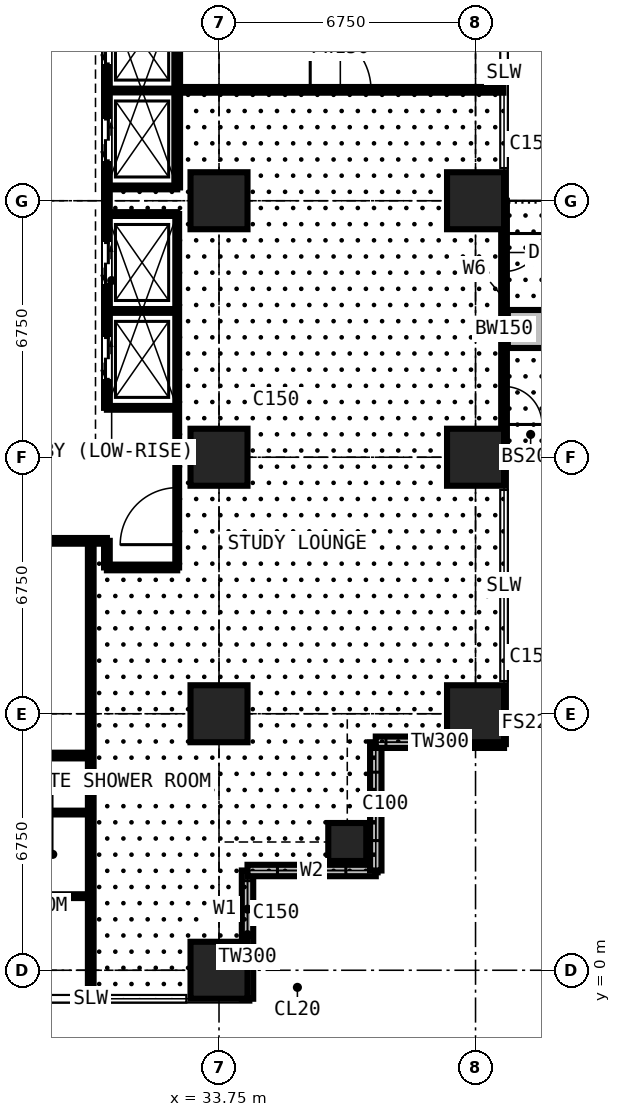
"""IFC4 building model, lengths in metres.
Left out: names, types, materials, properties, quantities, classifications, styles, units other than length and angle.
Written with IfcOpenShell. Run it as: python <this file> out.ifc"""

import sys

from ifc_helpers import new_model, si_unit, direction, frame, frame_2d, origin, origin_2d, place, context, subcontext, project, spatial, rectangle, extrude, element, fill, save


model = new_model("IFC4")
c1 = context("Model", 3, precision=1e-05, world=origin(), true_north=direction((0.0, 1.0)))
c2 = subcontext(c1, "Body", "Model", "MODEL_VIEW")
j1 = project(units=[si_unit("LENGTHUNIT", "METRE"), si_unit("PLANEANGLEUNIT", "RADIAN")], contexts=[c1])
p1 = place(None, origin())
s1 = spatial("IfcSite", under=j1, at=p1, CompositionType="ELEMENT")
p2 = place(p1, origin())
s2 = spatial("IfcBuilding", under=s1, at=p2, CompositionType="ELEMENT")
p3 = place(p2, frame((0.0, 0.0, 108.9)))
s3 = spatial("IfcBuildingStorey", under=s2, at=p3, CompositionType="ELEMENT", Elevation=108.9)
for number, where, z_axis, x_axis in (
    (1, (33.75, 0.0, 0.0), (0.0, 0.0, 1.0), (1.0, 0.0, 0.0)),
    (2, (33.75, 6.75, 0.0), (0.0, 0.0, 1.0), (1.0, 0.0, 0.0)),
    (3, (33.75, 13.5, 0.0), (0.0, 0.0, 1.0), (1.0, 0.0, 0.0)),
    (4, (33.75, 20.25, 0.0), (0.0, 0.0, 1.0), (1.0, 0.0, 0.0)),
):
    element("IfcColumn", number, at=place(p3, frame(where, z_axis=z_axis, x_axis=x_axis)), inside=s3, PredefinedType="COLUMN", context=c2, shape_type="SweptSolid", body=[
        extrude(rectangle(XDim=1.5, YDim=1.5, at=origin_2d()), origin(), (0.0, 0.0, 1.0), 3.6),
    ])
p4 = place(p3, frame((37.125, 3.375, 0.0), z_axis=(0.0, 0.0, 1.0), x_axis=(1.0, 0.0, 0.0)))
e5 = element("IfcColumn", 5, at=p4, inside=s3, PredefinedType="COLUMN", context=c2, shape_type="SweptSolid", body=[
    extrude(rectangle(XDim=1.0, YDim=1.0, at=origin_2d()), origin(), (0.0, 0.0, 1.0), 3.6),
])
for number, where, z_axis, x_axis in (
    (6, (40.5, 6.75, 0.0), (0.0, 0.0, 1.0), (1.0, 0.0, 0.0)),
    (7, (40.5, 13.5, 0.0), (0.0, 0.0, 1.0), (1.0, 0.0, 0.0)),
    (8, (40.5, 20.25, 0.0), (0.0, 0.0, 1.0), (1.0, 0.0, 0.0)),
):
    element("IfcColumn", number, at=place(p3, frame(where, z_axis=z_axis, x_axis=x_axis)), inside=s3, PredefinedType="COLUMN", context=c2, shape_type="SweptSolid", body=[
        extrude(rectangle(XDim=1.5, YDim=1.5, at=origin_2d()), origin(), (0.0, 0.0, 1.0), 3.6),
    ])
p5 = place(p3, frame((41.25, 20.25, 0.0), z_axis=(0.0, 0.0, 1.0), x_axis=(0.0, -1.0, 0.0)))
e9 = element("IfcWall", 9, at=p5, inside=s3, PredefinedType="SOLIDWALL", context=c2, shape_type="SweptSolid", body=[
    extrude(rectangle(XDim=6.75, YDim=0.15, at=frame_2d((3.375, 0.0))), origin(), (0.0, 0.0, 1.0), 3.375),
])
p6 = place(p5, frame((0.863, 0.0, 0.0)))
e10 = element("IfcOpeningElement", 10, at=p6, cuts=e9, PredefinedType="OPENING", context=c2, shape_type="SweptSolid", body=[
    extrude(rectangle(XDim=1.0, YDim=2.2, at=frame_2d((0.5, 1.1))), frame((0.0, 0.085, 0.0), z_axis=(0.0, -1.0, 0.0), x_axis=(1.0, 0.0, 0.0)), (0.0, 0.0, 1.0), 0.17),
])
p7 = place(p5, frame((1.975, 0.0, 0.9)))
e11 = element("IfcOpeningElement", 11, at=p7, cuts=e9, PredefinedType="OPENING", context=c2, shape_type="SweptSolid", body=[
    extrude(rectangle(XDim=1.2, YDim=1.8, at=frame_2d((0.6, 0.9))), frame((0.0, 0.085, 0.0), z_axis=(0.0, -1.0, 0.0), x_axis=(1.0, 0.0, 0.0)), (0.0, 0.0, 1.0), 0.17),
])
p8 = place(p5, frame((4.887, 0.0, 0.0)))
e12 = element("IfcOpeningElement", 12, at=p8, cuts=e9, PredefinedType="OPENING", context=c2, shape_type="SweptSolid", body=[
    extrude(rectangle(XDim=1.0, YDim=2.2, at=frame_2d((0.5, 1.1))), frame((0.0, 0.085, 0.0), z_axis=(0.0, -1.0, 0.0), x_axis=(1.0, 0.0, 0.0)), (0.0, 0.0, 1.0), 0.17),
])
p9 = place(p5, frame((3.575, 0.0, 0.9)))
e13 = element("IfcOpeningElement", 13, at=p9, cuts=e9, PredefinedType="OPENING", context=c2, shape_type="SweptSolid", body=[
    extrude(rectangle(XDim=1.2, YDim=1.8, at=frame_2d((0.6, 0.9))), frame((0.0, 0.085, 0.0), z_axis=(0.0, -1.0, 0.0), x_axis=(1.0, 0.0, 0.0)), (0.0, 0.0, 1.0), 0.17),
])
p10 = place(p3, frame((34.5, -0.75, 0.0), z_axis=(0.0, 0.0, 1.0), x_axis=(0.0, 1.0, 0.0)))
e14 = element("IfcWall", 14, at=p10, inside=s3, PredefinedType="SOLIDWALL", context=c2, shape_type="SweptSolid", body=[
    extrude(rectangle(XDim=3.375, YDim=0.3, at=frame_2d((1.688, 0.0))), origin(), (0.0, 0.0, 1.0), 3.375),
])
p11 = place(p10, frame((1.607, 0.0, 0.9)))
e15 = element("IfcOpeningElement", 15, at=p11, cuts=e14, PredefinedType="OPENING", context=c2, shape_type="SweptSolid", body=[
    extrude(rectangle(XDim=1.5, YDim=1.8, at=frame_2d((0.75, 0.9))), frame((0.0, 0.16, 0.0), z_axis=(0.0, -1.0, 0.0), x_axis=(1.0, 0.0, 0.0)), (0.0, 0.0, 1.0), 0.32),
])
p12 = place(p3, frame((34.5, 2.625, 0.0), z_axis=(0.0, 0.0, 1.0), x_axis=(1.0, 0.0, 0.0)))
e16 = element("IfcWall", 16, at=p12, inside=s3, PredefinedType="SOLIDWALL", context=c2, shape_type="SweptSolid", body=[
    extrude(rectangle(XDim=3.375, YDim=0.3, at=frame_2d((1.688, 0.0))), origin(), (0.0, 0.0, 1.0), 3.375),
])
p13 = place(p12, frame((0.788, 0.0, 0.6)))
e17 = element("IfcOpeningElement", 17, at=p13, cuts=e16, PredefinedType="OPENING", context=c2, shape_type="SweptSolid", body=[
    extrude(rectangle(XDim=1.8, YDim=2.1, at=frame_2d((0.9, 1.05))), frame((0.0, 0.16, 0.0), z_axis=(0.0, -1.0, 0.0), x_axis=(1.0, 0.0, 0.0)), (0.0, 0.0, 1.0), 0.32),
])
p14 = place(p3, frame((37.875, 2.625, 0.0), z_axis=(0.0, 0.0, 1.0), x_axis=(0.0, 1.0, 0.0)))
e18 = element("IfcWall", 18, at=p14, inside=s3, PredefinedType="SOLIDWALL", context=c2, shape_type="SweptSolid", body=[
    extrude(rectangle(XDim=3.375, YDim=0.3, at=frame_2d((1.688, 0.0))), origin(), (0.0, 0.0, 1.0), 3.375),
])
p15 = place(p14, frame((0.788, 0.0, 0.6)))
e19 = element("IfcOpeningElement", 19, at=p15, cuts=e18, PredefinedType="OPENING", context=c2, shape_type="SweptSolid", body=[
    extrude(rectangle(XDim=1.8, YDim=2.1, at=frame_2d((0.9, 1.05))), frame((0.0, 0.16, 0.0), z_axis=(0.0, -1.0, 0.0), x_axis=(1.0, 0.0, 0.0)), (0.0, 0.0, 1.0), 0.32),
])
p16 = place(p3, frame((37.875, 6.0, 0.0), z_axis=(0.0, 0.0, 1.0), x_axis=(1.0, 0.0, 0.0)))
e20 = element("IfcWall", 20, at=p16, inside=s3, PredefinedType="SOLIDWALL", context=c2, shape_type="SweptSolid", body=[
    extrude(rectangle(XDim=3.375, YDim=0.3, at=frame_2d((1.688, 0.0))), origin(), (0.0, 0.0, 1.0), 3.375),
])
p17 = place(p16, frame((0.268, 0.0, 0.9)))
e21 = element("IfcOpeningElement", 21, at=p17, cuts=e20, PredefinedType="OPENING", context=c2, shape_type="SweptSolid", body=[
    extrude(rectangle(XDim=1.5, YDim=1.8, at=frame_2d((0.75, 0.9))), frame((0.0, 0.16, 0.0), z_axis=(0.0, -1.0, 0.0), x_axis=(1.0, 0.0, 0.0)), (0.0, 0.0, 1.0), 0.32),
])
p18 = place(p3, frame((41.35, 16.875, 0.0), z_axis=(0.0, 0.0, 1.0), x_axis=(1.0, 0.0, 0.0)))
e22 = element("IfcWall", 22, at=p18, inside=s3, PredefinedType="USERDEFINED", context=c2, shape_type="SweptSolid", body=[
    extrude(rectangle(XDim=2.2, YDim=1.0, at=frame_2d((1.1, 0.0))), origin(), (0.0, 0.0, 1.0), 0.9),
])
p19 = place(p3, frame((6.75, 4.15, 0.0), z_axis=(0.0, 0.0, 1.0), x_axis=(1.0, 0.0, 0.0)))
e23 = element("IfcWall", 23, at=p19, inside=s3, PredefinedType="PARTITIONING", context=c2, shape_type="SweptSolid", body=[
    extrude(rectangle(XDim=23.625, YDim=0.1, at=frame_2d((11.812, 0.0))), origin(), (0.0, 0.0, 1.0), 3.375),
])
p20 = place(p19, frame((0.2, 0.0, 0.0)))
e24 = element("IfcOpeningElement", 24, at=p20, cuts=e23, PredefinedType="OPENING", context=c2, shape_type="SweptSolid", body=[
    extrude(rectangle(XDim=0.95, YDim=2.2, at=frame_2d((0.475, 1.1))), frame((0.0, 0.06, 0.0), z_axis=(0.0, -1.0, 0.0), x_axis=(1.0, 0.0, 0.0)), (0.0, 0.0, 1.0), 0.12),
])
p21 = place(p19, frame((3.625, 0.0, 0.0)))
e25 = element("IfcOpeningElement", 25, at=p21, cuts=e23, PredefinedType="OPENING", context=c2, shape_type="SweptSolid", body=[
    extrude(rectangle(XDim=0.95, YDim=2.2, at=frame_2d((0.475, 1.1))), frame((0.0, 0.06, 0.0), z_axis=(0.0, -1.0, 0.0), x_axis=(1.0, 0.0, 0.0)), (0.0, 0.0, 1.0), 0.12),
])
p22 = place(p19, frame((7.0, 0.0, 0.0)))
e26 = element("IfcOpeningElement", 26, at=p22, cuts=e23, PredefinedType="OPENING", context=c2, shape_type="SweptSolid", body=[
    extrude(rectangle(XDim=0.95, YDim=2.2, at=frame_2d((0.475, 1.1))), frame((0.0, 0.06, 0.0), z_axis=(0.0, -1.0, 0.0), x_axis=(1.0, 0.0, 0.0)), (0.0, 0.0, 1.0), 0.12),
])
p23 = place(p19, frame((10.375, 0.0, 0.0)))
e27 = element("IfcOpeningElement", 27, at=p23, cuts=e23, PredefinedType="OPENING", context=c2, shape_type="SweptSolid", body=[
    extrude(rectangle(XDim=0.95, YDim=2.2, at=frame_2d((0.475, 1.1))), frame((0.0, 0.06, 0.0), z_axis=(0.0, -1.0, 0.0), x_axis=(1.0, 0.0, 0.0)), (0.0, 0.0, 1.0), 0.12),
])
p24 = place(p19, frame((13.75, 0.0, 0.0)))
e28 = element("IfcOpeningElement", 28, at=p24, cuts=e23, PredefinedType="OPENING", context=c2, shape_type="SweptSolid", body=[
    extrude(rectangle(XDim=0.95, YDim=2.2, at=frame_2d((0.475, 1.1))), frame((0.0, 0.06, 0.0), z_axis=(0.0, -1.0, 0.0), x_axis=(1.0, 0.0, 0.0)), (0.0, 0.0, 1.0), 0.12),
])
p25 = place(p19, frame((17.125, 0.0, 0.0)))
e29 = element("IfcOpeningElement", 29, at=p25, cuts=e23, PredefinedType="OPENING", context=c2, shape_type="SweptSolid", body=[
    extrude(rectangle(XDim=0.95, YDim=2.2, at=frame_2d((0.475, 1.1))), frame((0.0, 0.06, 0.0), z_axis=(0.0, -1.0, 0.0), x_axis=(1.0, 0.0, 0.0)), (0.0, 0.0, 1.0), 0.12),
])
p26 = place(p19, frame((20.5, 0.0, 0.0)))
e30 = element("IfcOpeningElement", 30, at=p26, cuts=e23, PredefinedType="OPENING", context=c2, shape_type="SweptSolid", body=[
    extrude(rectangle(XDim=0.95, YDim=2.2, at=frame_2d((0.475, 1.1))), frame((0.0, 0.06, 0.0), z_axis=(0.0, -1.0, 0.0), x_axis=(1.0, 0.0, 0.0)), (0.0, 0.0, 1.0), 0.12),
])
p27 = place(p3, frame((10.125, 11.3, 0.0), z_axis=(0.0, 0.0, 1.0), x_axis=(1.0, 0.0, 0.0)))
e31 = element("IfcWall", 31, at=p27, inside=s3, PredefinedType="PARTITIONING", context=c2, shape_type="SweptSolid", body=[
    extrude(rectangle(XDim=20.675, YDim=0.15, at=frame_2d((10.337, 0.0))), origin(), (0.0, 0.0, 1.0), 3.375),
])
p28 = place(p27, frame((11.312, 0.0, 0.0)))
e32 = element("IfcOpeningElement", 32, at=p28, cuts=e31, PredefinedType="OPENING", context=c2, shape_type="SweptSolid", body=[
    extrude(rectangle(XDim=1.0, YDim=2.2, at=frame_2d((0.5, 1.1))), frame((0.0, 0.085, 0.0), z_axis=(0.0, -1.0, 0.0), x_axis=(1.0, 0.0, 0.0)), (0.0, 0.0, 1.0), 0.17),
])
p29 = place(p3, frame((22.988, 5.65, 0.0), z_axis=(0.0, 0.0, 1.0), x_axis=(1.0, 0.0, 0.0)))
e33 = element("IfcWall", 33, at=p29, inside=s3, PredefinedType="PARTITIONING", context=c2, shape_type="SweptSolid", body=[
    extrude(rectangle(XDim=7.387, YDim=0.15, at=frame_2d((3.694, 0.0))), origin(), (0.0, 0.0, 1.0), 3.375),
])
p30 = place(p29, frame((2.3, 0.0, 0.0)))
e34 = element("IfcOpeningElement", 34, at=p30, cuts=e33, PredefinedType="OPENING", context=c2, shape_type="SweptSolid", body=[
    extrude(rectangle(XDim=0.95, YDim=2.2, at=frame_2d((0.475, 1.1))), frame((0.0, 0.085, 0.0), z_axis=(0.0, -1.0, 0.0), x_axis=(1.0, 0.0, 0.0)), (0.0, 0.0, 1.0), 0.17),
])
p31 = place(p3, frame((28.375, 1.95, 0.0), z_axis=(0.0, 0.0, 1.0), x_axis=(1.0, 0.0, 0.0)))
e35 = element("IfcWall", 35, at=p31, inside=s3, PredefinedType="PARTITIONING", context=c2, shape_type="SweptSolid", body=[
    extrude(rectangle(XDim=2.0, YDim=0.1, at=frame_2d((1.0, 0.0))), origin(), (0.0, 0.0, 1.0), 3.375),
])
p32 = place(p3, frame((30.375, -0.734, 0.0), z_axis=(0.0, 0.0, 1.0), x_axis=(0.0, 1.0, 0.0)))
e36 = element("IfcWall", 36, at=p32, inside=s3, PredefinedType="PARTITIONING", context=c2, shape_type="SweptSolid", body=[
    extrude(rectangle(XDim=12.034, YDim=0.15, at=frame_2d((6.017, 0.0))), origin(), (0.0, 0.0, 1.0), 3.375),
])
p33 = place(p3, frame((30.8, 10.6, 0.0), z_axis=(0.0, 0.0, 1.0), x_axis=(0.0, 1.0, 0.0)))
e37 = element("IfcWall", 37, at=p33, inside=s3, PredefinedType="PARTITIONING", context=c2, shape_type="SweptSolid", body=[
    extrude(rectangle(XDim=0.7, YDim=0.15, at=frame_2d((0.35, 0.0))), origin(), (0.0, 0.0, 1.0), 3.375),
])
p34 = place(p3, frame((30.8, 10.6, 0.0), z_axis=(0.0, 0.0, 1.0), x_axis=(1.0, 0.0, 0.0)))
e38 = element("IfcWall", 38, at=p34, inside=s3, PredefinedType="PARTITIONING", context=c2, shape_type="SweptSolid", body=[
    extrude(rectangle(XDim=1.85, YDim=0.15, at=frame_2d((0.925, 0.0))), origin(), (0.0, 0.0, 1.0), 3.375),
])
p35 = place(p3, frame((30.8, 14.8, 0.0), z_axis=(0.0, 0.0, 1.0), x_axis=(0.0, 1.0, 0.0)))
e39 = element("IfcWall", 39, at=p35, inside=s3, PredefinedType="PARTITIONING", context=c2, shape_type="SweptSolid", body=[
    extrude(rectangle(XDim=10.9, YDim=0.15, at=frame_2d((5.45, 0.0))), origin(), (0.0, 0.0, 1.0), 3.375),
])
p36 = place(p35, frame((0.75, 0.0, 0.0)))
e40 = element("IfcOpeningElement", 40, at=p36, cuts=e39, PredefinedType="OPENING", context=c2, shape_type="SweptSolid", body=[
    extrude(rectangle(XDim=1.1, YDim=2.2, at=frame_2d((0.55, 1.1))), frame((0.0, 0.085, 0.0), z_axis=(0.0, -1.0, 0.0), x_axis=(1.0, 0.0, 0.0)), (0.0, 0.0, 1.0), 0.17),
])
p37 = place(p35, frame((3.25, 0.0, 0.0)))
e41 = element("IfcOpeningElement", 41, at=p37, cuts=e39, PredefinedType="OPENING", context=c2, shape_type="SweptSolid", body=[
    extrude(rectangle(XDim=1.1, YDim=2.2, at=frame_2d((0.55, 1.1))), frame((0.0, 0.085, 0.0), z_axis=(0.0, -1.0, 0.0), x_axis=(1.0, 0.0, 0.0)), (0.0, 0.0, 1.0), 0.17),
])
p38 = place(p35, frame((6.5, 0.0, 0.0)))
e42 = element("IfcOpeningElement", 42, at=p38, cuts=e39, PredefinedType="OPENING", context=c2, shape_type="SweptSolid", body=[
    extrude(rectangle(XDim=1.1, YDim=2.2, at=frame_2d((0.55, 1.1))), frame((0.0, 0.085, 0.0), z_axis=(0.0, -1.0, 0.0), x_axis=(1.0, 0.0, 0.0)), (0.0, 0.0, 1.0), 0.17),
])
p39 = place(p35, frame((9.05, 0.0, 0.0)))
e43 = element("IfcOpeningElement", 43, at=p39, cuts=e39, PredefinedType="OPENING", context=c2, shape_type="SweptSolid", body=[
    extrude(rectangle(XDim=1.1, YDim=2.2, at=frame_2d((0.55, 1.1))), frame((0.0, 0.085, 0.0), z_axis=(0.0, -1.0, 0.0), x_axis=(1.0, 0.0, 0.0)), (0.0, 0.0, 1.0), 0.17),
])
for number, where, z_axis, x_axis in (
    (44, (30.8, 14.8, 0.0), (0.0, 0.0, 1.0), (1.0, 0.0, 0.0)),
    (45, (30.8, 17.35, 0.0), (0.0, 0.0, 1.0), (1.0, 0.0, 0.0)),
    (46, (30.8, 19.9, 0.0), (0.0, 0.0, 1.0), (1.0, 0.0, 0.0)),
    (47, (30.8, 20.6, 0.0), (0.0, 0.0, 1.0), (1.0, 0.0, 0.0)),
    (48, (30.8, 23.15, 0.0), (0.0, 0.0, 1.0), (1.0, 0.0, 0.0)),
):
    element("IfcWall", number, at=place(p3, frame(where, z_axis=z_axis, x_axis=x_axis)), inside=s3, PredefinedType="SHEAR", context=c2, shape_type="SweptSolid", body=[
        extrude(rectangle(XDim=1.85, YDim=0.1, at=frame_2d((0.925, 0.0))), origin(), (0.0, 0.0, 1.0), 3.375),
    ])
p40 = place(p3, frame((32.65, 10.6, 0.0), z_axis=(0.0, 0.0, 1.0), x_axis=(0.0, 1.0, 0.0)))
e49 = element("IfcWall", 49, at=p40, inside=s3, PredefinedType="SHEAR", context=c2, shape_type="SweptSolid", body=[
    extrude(rectangle(XDim=9.3, YDim=0.1, at=frame_2d((4.65, 0.0))), origin(), (0.0, 0.0, 1.0), 3.375),
])
p41 = place(p40, frame((0.6, 0.0, 0.0)))
e50 = element("IfcOpeningElement", 50, at=p41, cuts=e49, PredefinedType="OPENING", context=c2, shape_type="SweptSolid", body=[
    extrude(rectangle(XDim=1.5, YDim=2.2, at=frame_2d((0.75, 1.1))), frame((0.0, 0.06, 0.0), z_axis=(0.0, -1.0, 0.0), x_axis=(1.0, 0.0, 0.0)), (0.0, 0.0, 1.0), 0.12),
])
p42 = place(p3, frame((32.65, 20.6, 0.0), z_axis=(0.0, 0.0, 1.0), x_axis=(0.0, 1.0, 0.0)))
e51 = element("IfcWall", 51, at=p42, inside=s3, PredefinedType="PARTITIONING", context=c2, shape_type="SweptSolid", body=[
    extrude(rectangle(XDim=5.1, YDim=0.15, at=frame_2d((2.55, 0.0))), origin(), (0.0, 0.0, 1.0), 3.375),
])
p43 = place(p3, frame((32.65, 23.168, 0.0), z_axis=(0.0, 0.0, 1.0), x_axis=(1.0, 0.0, 0.0)))
e52 = element("IfcWall", 52, at=p43, inside=s3, PredefinedType="PARTITIONING", context=c2, shape_type="SweptSolid", body=[
    extrude(rectangle(XDim=8.584, YDim=0.15, at=frame_2d((4.292, 0.0))), origin(), (0.0, 0.0, 1.0), 3.375),
])
p44 = place(p43, frame((3.5, 0.0, 0.0)))
e53 = element("IfcOpeningElement", 53, at=p44, cuts=e52, PredefinedType="OPENING", context=c2, shape_type="SweptSolid", body=[
    extrude(rectangle(XDim=1.6, YDim=2.4, at=frame_2d((0.8, 1.2))), frame((0.0, 0.085, 0.0), z_axis=(0.0, -1.0, 0.0), x_axis=(1.0, 0.0, 0.0)), (0.0, 0.0, 1.0), 0.17),
])
p45 = place(p6, origin())
e54 = element("IfcDoor", 54, at=p45, inside=s3, OperationType="SINGLE_SWING_LEFT", PredefinedType="DOOR", context=c2, shape_type="SweptSolid", body=[
    extrude(rectangle(XDim=1.0, YDim=2.2, at=frame_2d((0.5, 1.1))), frame((0.0, 0.025, 0.0), z_axis=(0.0, -1.0, 0.0), x_axis=(1.0, 0.0, 0.0)), (0.0, 0.0, 1.0), 0.05),
])
fill(e10, e54)
p46 = place(p7, origin())
e55 = element("IfcWindow", 55, at=p46, inside=s3, PartitioningType="SINGLE_PANEL", PredefinedType="WINDOW", context=c2, shape_type="SweptSolid", body=[
    extrude(rectangle(XDim=1.2, YDim=1.8, at=frame_2d((0.6, 0.9))), frame((0.0, 0.03, 0.0), z_axis=(0.0, -1.0, 0.0), x_axis=(1.0, 0.0, 0.0)), (0.0, 0.0, 1.0), 0.06),
])
fill(e11, e55)
p47 = place(p8, origin())
e56 = element("IfcDoor", 56, at=p47, inside=s3, OperationType="SINGLE_SWING_RIGHT", PredefinedType="DOOR", context=c2, shape_type="SweptSolid", body=[
    extrude(rectangle(XDim=1.0, YDim=2.2, at=frame_2d((0.5, 1.1))), frame((0.0, 0.025, 0.0), z_axis=(0.0, -1.0, 0.0), x_axis=(1.0, 0.0, 0.0)), (0.0, 0.0, 1.0), 0.05),
])
fill(e12, e56)
p48 = place(p9, origin())
e57 = element("IfcWindow", 57, at=p48, inside=s3, PartitioningType="SINGLE_PANEL", PredefinedType="WINDOW", context=c2, shape_type="SweptSolid", body=[
    extrude(rectangle(XDim=1.2, YDim=1.8, at=frame_2d((0.6, 0.9))), frame((0.0, 0.03, 0.0), z_axis=(0.0, -1.0, 0.0), x_axis=(1.0, 0.0, 0.0)), (0.0, 0.0, 1.0), 0.06),
])
fill(e13, e57)
p49 = place(p11, origin())
e58 = element("IfcWindow", 58, at=p49, inside=s3, PartitioningType="SINGLE_PANEL", PredefinedType="WINDOW", context=c2, shape_type="SweptSolid", body=[
    extrude(rectangle(XDim=1.5, YDim=1.8, at=frame_2d((0.75, 0.9))), frame((0.0, 0.03, 0.0), z_axis=(0.0, -1.0, 0.0), x_axis=(1.0, 0.0, 0.0)), (0.0, 0.0, 1.0), 0.06),
])
fill(e15, e58)
p50 = place(p13, origin())
e59 = element("IfcWindow", 59, at=p50, inside=s3, PartitioningType="SINGLE_PANEL", PredefinedType="WINDOW", context=c2, shape_type="SweptSolid", body=[
    extrude(rectangle(XDim=1.8, YDim=2.1, at=frame_2d((0.9, 1.05))), frame((0.0, 0.03, 0.0), z_axis=(0.0, -1.0, 0.0), x_axis=(1.0, 0.0, 0.0)), (0.0, 0.0, 1.0), 0.06),
])
fill(e17, e59)
p51 = place(p15, origin())
e60 = element("IfcWindow", 60, at=p51, inside=s3, PartitioningType="SINGLE_PANEL", PredefinedType="WINDOW", context=c2, shape_type="SweptSolid", body=[
    extrude(rectangle(XDim=1.8, YDim=2.1, at=frame_2d((0.9, 1.05))), frame((0.0, 0.03, 0.0), z_axis=(0.0, -1.0, 0.0), x_axis=(1.0, 0.0, 0.0)), (0.0, 0.0, 1.0), 0.06),
])
fill(e19, e60)
p52 = place(p17, origin())
e61 = element("IfcWindow", 61, at=p52, inside=s3, PartitioningType="SINGLE_PANEL", PredefinedType="WINDOW", context=c2, shape_type="SweptSolid", body=[
    extrude(rectangle(XDim=1.5, YDim=1.8, at=frame_2d((0.75, 0.9))), frame((0.0, 0.03, 0.0), z_axis=(0.0, -1.0, 0.0), x_axis=(1.0, 0.0, 0.0)), (0.0, 0.0, 1.0), 0.06),
])
fill(e21, e61)
p53 = place(p44, origin())
e62 = element("IfcDoor", 62, at=p53, inside=s3, OperationType="DOUBLE_DOOR_SINGLE_SWING", PredefinedType="DOOR", context=c2, shape_type="SweptSolid", body=[
    extrude(rectangle(XDim=1.6, YDim=2.4, at=frame_2d((0.8, 1.2))), frame((0.0, 0.025, 0.0), z_axis=(0.0, -1.0, 0.0), x_axis=(1.0, 0.0, 0.0)), (0.0, 0.0, 1.0), 0.05),
])
fill(e53, e62)
p54 = place(p41, origin())
e63 = element("IfcDoor", 63, at=p54, inside=s3, OperationType="DOUBLE_DOOR_SINGLE_SWING", PredefinedType="DOOR", context=c2, shape_type="SweptSolid", body=[
    extrude(rectangle(XDim=1.5, YDim=2.2, at=frame_2d((0.75, 1.1))), frame((0.0, 0.025, 0.0), z_axis=(0.0, -1.0, 0.0), x_axis=(1.0, 0.0, 0.0)), (0.0, 0.0, 1.0), 0.05),
])
fill(e50, e63)
p55 = place(p36, origin())
e64 = element("IfcDoor", 64, at=p55, inside=s3, OperationType="DOUBLE_DOOR_SLIDING", PredefinedType="DOOR", context=c2, shape_type="SweptSolid", body=[
    extrude(rectangle(XDim=1.1, YDim=2.2, at=frame_2d((0.55, 1.1))), frame((0.0, 0.025, 0.0), z_axis=(0.0, -1.0, 0.0), x_axis=(1.0, 0.0, 0.0)), (0.0, 0.0, 1.0), 0.05),
])
fill(e40, e64)
p56 = place(p37, origin())
e65 = element("IfcDoor", 65, at=p56, inside=s3, OperationType="DOUBLE_DOOR_SLIDING", PredefinedType="DOOR", context=c2, shape_type="SweptSolid", body=[
    extrude(rectangle(XDim=1.1, YDim=2.2, at=frame_2d((0.55, 1.1))), frame((0.0, 0.025, 0.0), z_axis=(0.0, -1.0, 0.0), x_axis=(1.0, 0.0, 0.0)), (0.0, 0.0, 1.0), 0.05),
])
fill(e41, e65)
p57 = place(p38, origin())
e66 = element("IfcDoor", 66, at=p57, inside=s3, OperationType="DOUBLE_DOOR_SLIDING", PredefinedType="DOOR", context=c2, shape_type="SweptSolid", body=[
    extrude(rectangle(XDim=1.1, YDim=2.2, at=frame_2d((0.55, 1.1))), frame((0.0, 0.025, 0.0), z_axis=(0.0, -1.0, 0.0), x_axis=(1.0, 0.0, 0.0)), (0.0, 0.0, 1.0), 0.05),
])
fill(e42, e66)
p58 = place(p39, origin())
e67 = element("IfcDoor", 67, at=p58, inside=s3, OperationType="DOUBLE_DOOR_SLIDING", PredefinedType="DOOR", context=c2, shape_type="SweptSolid", body=[
    extrude(rectangle(XDim=1.1, YDim=2.2, at=frame_2d((0.55, 1.1))), frame((0.0, 0.025, 0.0), z_axis=(0.0, -1.0, 0.0), x_axis=(1.0, 0.0, 0.0)), (0.0, 0.0, 1.0), 0.05),
])
fill(e43, e67)
save(model, sys.argv[1])
